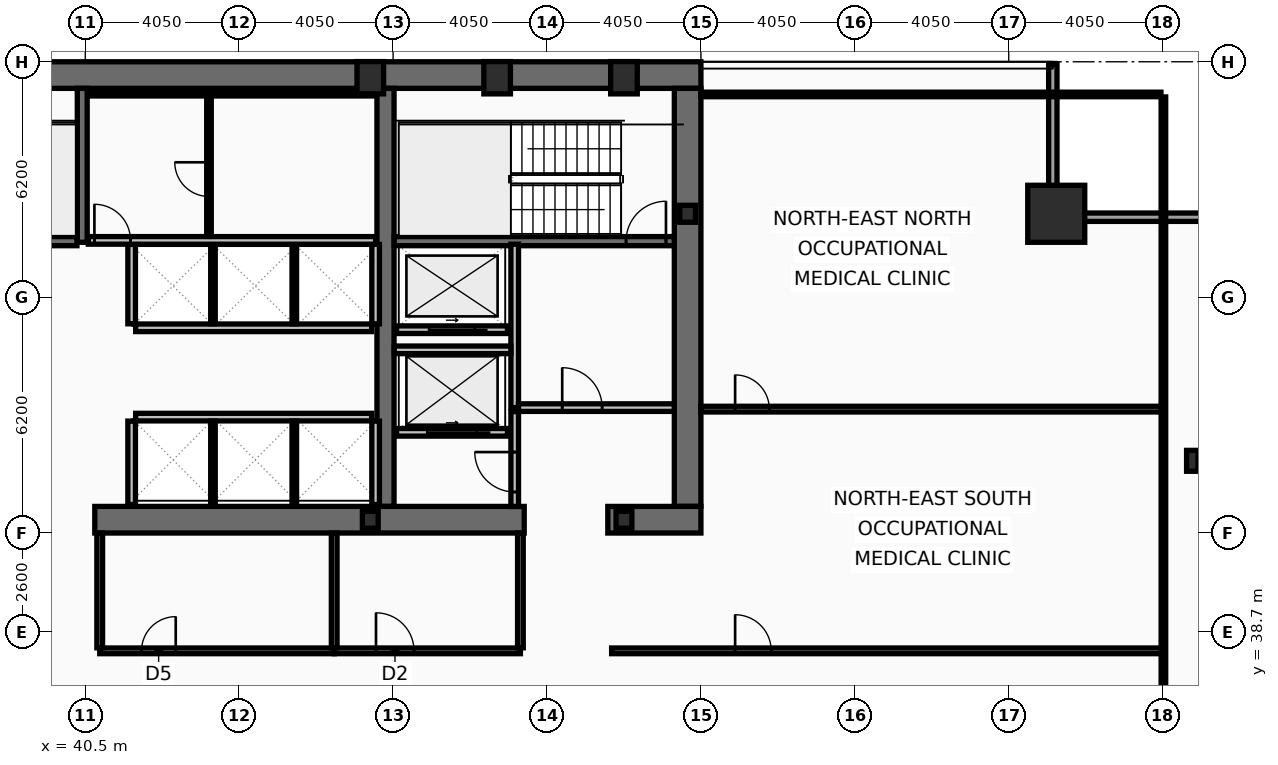
"""IFC4 building model, lengths in metres.
Left out: names, types, materials, properties, quantities, classifications, styles, units other than length and angle.
Written with IfcOpenShell. Run it as: python <this file> out.ifc"""

import sys

from ifc_helpers import new_model, si_unit, direction, frame, frame_2d, origin, origin_2d, place, context, subcontext, project, spatial, rectangle, hollow_rectangle, i_section, extrude, element, fill, save


model = new_model("IFC4")
c1 = context("Model", 3, precision=1e-05, world=origin(), true_north=direction((0.0, 1.0)))
c2 = subcontext(c1, "Body", "Model", "MODEL_VIEW")
j1 = project(units=[si_unit("LENGTHUNIT", "METRE"), si_unit("PLANEANGLEUNIT", "RADIAN")], contexts=[c1])
p1 = place(None, origin())
s1 = spatial("IfcSite", under=j1, at=p1, CompositionType="ELEMENT")
p2 = place(p1, origin())
s2 = spatial("IfcBuilding", under=s1, at=p2, CompositionType="ELEMENT")
p3 = place(p2, frame((0.0, 0.0, 132.6)))
s3 = spatial("IfcBuildingStorey", under=s2, at=p3, CompositionType="ELEMENT", Elevation=132.6)
p4 = place(p3, frame((16.2, 53.35, 0.0), z_axis=(0.0, 0.0, 1.0), x_axis=(1.0, 0.0, 0.0)))
e1 = element("IfcWall", 1, at=p4, inside=s3, PredefinedType="SHEAR", context=c2, shape_type="SweptSolid", body=[
    extrude(rectangle(XDim=40.5, YDim=0.7, at=frame_2d((20.25, 0.0))), origin(), (0.0, 0.0, 1.0), 3.44),
])
p5 = place(p3, frame((56.35, 53.0, 0.0), z_axis=(0.0, 0.0, 1.0), x_axis=(0.0, -1.0, 0.0)))
e2 = element("IfcWall", 2, at=p5, inside=s3, PredefinedType="SHEAR", context=c2, shape_type="SweptSolid", body=[
    extrude(rectangle(XDim=11.0, YDim=0.7, at=frame_2d((5.5, 0.0))), origin(), (0.0, 0.0, 1.0), 3.44),
])
p6 = place(p3, frame((48.4, 42.0, 0.0), z_axis=(0.0, 0.0, 1.0), x_axis=(0.0, 1.0, 0.0)))
e3 = element("IfcWall", 3, at=p6, inside=s3, PredefinedType="SHEAR", context=c2, shape_type="SweptSolid", body=[
    extrude(rectangle(XDim=11.0, YDim=0.45, at=frame_2d((5.5, 0.0))), origin(), (0.0, 0.0, 1.0), 3.44),
])
p7 = place(p3, frame((52.05, 41.65, 0.0), z_axis=(0.0, 0.0, 1.0), x_axis=(-1.0, 0.0, 0.0)))
e4 = element("IfcWall", 4, at=p7, inside=s3, PredefinedType="SHEAR", context=c2, shape_type="SweptSolid", body=[
    extrude(rectangle(XDim=11.3, YDim=0.7, at=frame_2d((5.65, 0.0))), origin(), (0.0, 0.0, 1.0), 3.44),
])
p8 = place(p3, frame((56.7, 41.65, 0.0), z_axis=(0.0, 0.0, 1.0), x_axis=(-1.0, 0.0, 0.0)))
e5 = element("IfcWall", 5, at=p8, inside=s3, PredefinedType="SHEAR", context=c2, shape_type="SweptSolid", body=[
    extrude(rectangle(XDim=2.45, YDim=0.7, at=frame_2d((1.225, 0.0))), origin(), (0.0, 0.0, 1.0), 3.44),
])
p9 = place(p3, frame((40.42, 48.95, 0.0), z_axis=(0.0, 0.0, 1.0), x_axis=(0.0, 1.0, 0.0)))
e6 = element("IfcWall", 6, at=p9, inside=s3, PredefinedType="SHEAR", context=c2, shape_type="SweptSolid", body=[
    extrude(rectangle(XDim=4.05, YDim=0.26, at=frame_2d((2.025, 0.0))), origin(), (0.0, 0.0, 1.0), 3.44),
])
p10 = place(p3, frame((48.63, 48.98, 0.0), z_axis=(0.0, 0.0, 1.0), x_axis=(1.0, 0.0, 0.0)))
e7 = element("IfcWall", 7, at=p10, inside=s3, PredefinedType="SHEAR", context=c2, shape_type="SweptSolid", body=[
    extrude(rectangle(XDim=7.37, YDim=0.24, at=frame_2d((3.685, 0.0))), origin(), (0.0, 0.0, 1.0), 3.44),
])
p11 = place(p10, frame((6.1, 0.0, 0.0)))
e8 = element("IfcOpeningElement", 8, at=p11, cuts=e7, PredefinedType="OPENING", context=c2, shape_type="SweptSolid", body=[
    extrude(rectangle(XDim=1.05, YDim=2.15, at=frame_2d((0.525, 1.075))), frame((0.0, 0.13, 0.0), z_axis=(0.0, -1.0, 0.0), x_axis=(1.0, 0.0, 0.0)), (0.0, 0.0, 1.0), 0.26),
])
p12 = place(p3, frame((32.72, 48.98, 0.0), z_axis=(0.0, 0.0, 1.0), x_axis=(1.0, 0.0, 0.0)))
e9 = element("IfcWall", 9, at=p12, inside=s3, PredefinedType="SHEAR", context=c2, shape_type="SweptSolid", body=[
    extrude(rectangle(XDim=7.56, YDim=0.24, at=frame_2d((3.78, 0.0))), origin(), (0.0, 0.0, 1.0), 3.44),
])
p13 = place(p12, frame((0.22, 0.0, 0.0)))
e10 = element("IfcOpeningElement", 10, at=p13, cuts=e9, PredefinedType="OPENING", context=c2, shape_type="SweptSolid", body=[
    extrude(rectangle(XDim=1.05, YDim=2.15, at=frame_2d((0.525, 1.075))), frame((0.0, 0.13, 0.0), z_axis=(0.0, -1.0, 0.0), x_axis=(1.0, 0.0, 0.0)), (0.0, 0.0, 1.0), 0.26),
])
p14 = place(p3, frame((66.05, 49.7, 0.0), z_axis=(0.0, 0.0, 1.0), x_axis=(1.0, 0.0, 0.0)))
e11 = element("IfcColumn", 11, at=p14, inside=s3, PredefinedType="COLUMN", context=c2, shape_type="SweptSolid", body=[
    extrude(hollow_rectangle(XDim=1.5, YDim=1.5, WallThickness=0.07, at=origin_2d()), origin(), (0.0, 0.0, 1.0), 3.6),
])
for number, where, z_axis, x_axis in (
    (12, (48.0, 53.28, 0.0), (0.0, 0.0, 1.0), (1.0, 0.0, 0.0)),
    (13, (51.337, 53.28, 0.0), (0.0, 0.0, 1.0), (1.0, 0.0, 0.0)),
    (14, (54.675, 53.28, 0.0), (0.0, 0.0, 1.0), (1.0, 0.0, 0.0)),
):
    element("IfcColumn", number, at=place(p3, frame(where, z_axis=z_axis, x_axis=x_axis)), inside=s3, PredefinedType="COLUMN", context=c2, shape_type="SweptSolid", body=[
        extrude(hollow_rectangle(XDim=0.7, YDim=0.85, WallThickness=0.05, at=origin_2d()), origin(), (0.0, 0.0, 1.0), 3.6),
    ])
p15 = place(p3, frame((69.63, 43.2, 0.0), z_axis=(0.0, 0.0, 1.0), x_axis=(1.0, 0.0, 0.0)))
e15 = element("IfcColumn", 15, at=p15, inside=s3, PredefinedType="COLUMN", context=c2, shape_type="SweptSolid", body=[
    extrude(i_section(OverallWidth=0.3, OverallDepth=0.55, WebThickness=0.015, FlangeThickness=0.029, at=origin_2d()), origin(), (0.0, 0.0, 1.0), 3.6),
])
for number, where, z_axis, x_axis in (
    (16, (56.35, 49.7, 0.0), (0.0, 0.0, 1.0), (1.0, 0.0, 0.0)),
    (17, (48.0, 41.65, 0.0), (0.0, 0.0, 1.0), (1.0, 0.0, 0.0)),
    (18, (54.675, 41.65, 0.0), (0.0, 0.0, 1.0), (1.0, 0.0, 0.0)),
):
    element("IfcColumn", number, at=place(p3, frame(where, z_axis=z_axis, x_axis=x_axis)), inside=s3, PredefinedType="COLUMN", context=c2, shape_type="SweptSolid", body=[
        extrude(i_section(OverallWidth=0.416, OverallDepth=0.446, WebThickness=0.039, FlangeThickness=0.063, at=origin_2d()), origin(), (0.0, 0.0, 1.0), 3.6),
    ])
p16 = place(p3, frame((65.96, 53.63, 0.0), z_axis=(0.0, 0.0, 1.0), x_axis=(0.0, -1.0, 0.0)))
e19 = element("IfcWall", 19, at=p16, inside=s3, PredefinedType="SOLIDWALL", context=c2, shape_type="SweptSolid", body=[
    extrude(rectangle(XDim=3.91, YDim=0.22, at=frame_2d((1.955, 0.0))), origin(), (0.0, 0.0, 1.0), 2.09),
])
p17 = place(p3, frame((65.85, 49.61, 0.0), z_axis=(0.0, 0.0, 1.0), x_axis=(1.0, 0.0, 0.0)))
e20 = element("IfcWall", 20, at=p17, inside=s3, PredefinedType="SOLIDWALL", context=c2, shape_type="SweptSolid", body=[
    extrude(rectangle(XDim=4.13, YDim=0.22, at=frame_2d((2.065, 0.0))), origin(), (0.0, 0.0, 1.0), 2.09),
])
p18 = place(p3, frame((51.61, 43.95, 0.0), z_axis=(0.0, 0.0, 1.0), x_axis=(-1.0, 0.0, 0.0)))
e21 = element("IfcWall", 21, at=p18, inside=s3, PredefinedType="PARTITIONING", context=c2, shape_type="SweptSolid", body=[
    extrude(rectangle(XDim=2.92, YDim=0.2, at=frame_2d((1.46, 0.0))), origin(), (0.0, 0.0, 1.0), 3.44),
])
p19 = place(p18, frame((0.81, 0.0, 0.0)))
e22 = element("IfcOpeningElement", 22, at=p19, cuts=e21, PredefinedType="OPENING", context=c2, shape_type="SweptSolid", body=[
    extrude(rectangle(XDim=1.3, YDim=2.18, at=frame_2d((0.65, 1.09))), frame((0.0, 0.11, 0.0), z_axis=(0.0, -1.0, 0.0), x_axis=(1.0, 0.0, 0.0)), (0.0, 0.0, 1.0), 0.22),
])
p20 = place(p3, frame((51.61, 46.65, 0.0), z_axis=(0.0, 0.0, 1.0), x_axis=(-1.0, 0.0, 0.0)))
e23 = element("IfcWall", 23, at=p20, inside=s3, PredefinedType="PARTITIONING", context=c2, shape_type="SweptSolid", body=[
    extrude(rectangle(XDim=2.92, YDim=0.2, at=frame_2d((1.46, 0.0))), origin(), (0.0, 0.0, 1.0), 3.44),
])
p21 = place(p20, frame((0.86, 0.0, 0.0)))
e24 = element("IfcOpeningElement", 24, at=p21, cuts=e23, PredefinedType="OPENING", context=c2, shape_type="SweptSolid", body=[
    extrude(rectangle(XDim=1.2, YDim=2.18, at=frame_2d((0.6, 1.09))), frame((0.0, 0.11, 0.0), z_axis=(0.0, -1.0, 0.0), x_axis=(1.0, 0.0, 0.0)), (0.0, 0.0, 1.0), 0.22),
])
p22 = place(p3, frame((51.8, 44.6, 0.0), z_axis=(0.0, 0.0, 1.0), x_axis=(0.0, 1.0, 0.0)))
e25 = element("IfcWall", 25, at=p22, inside=s3, PredefinedType="PARTITIONING", context=c2, shape_type="SweptSolid", body=[
    extrude(rectangle(XDim=4.3, YDim=0.2, at=frame_2d((2.15, 0.0))), origin(), (0.0, 0.0, 1.0), 3.44),
])
p23 = place(p3, frame((51.9, 44.6, 0.0), z_axis=(0.0, 0.0, 1.0), x_axis=(1.0, 0.0, 0.0)))
e26 = element("IfcWall", 26, at=p23, inside=s3, PredefinedType="PARTITIONING", context=c2, shape_type="SweptSolid", body=[
    extrude(rectangle(XDim=4.1, YDim=0.2, at=frame_2d((2.05, 0.0))), origin(), (0.0, 0.0, 1.0), 3.44),
])
p24 = place(p23, frame((1.15, 0.0, 0.0)))
e27 = element("IfcOpeningElement", 27, at=p24, cuts=e26, PredefinedType="OPENING", context=c2, shape_type="SweptSolid", body=[
    extrude(rectangle(XDim=1.05, YDim=2.15, at=frame_2d((0.525, 1.075))), frame((0.0, 0.11, 0.0), z_axis=(0.0, -1.0, 0.0), x_axis=(1.0, 0.0, 0.0)), (0.0, 0.0, 1.0), 0.22),
])
p25 = place(p3, frame((48.63, 46.12, 0.0), z_axis=(0.0, 0.0, 1.0), x_axis=(1.0, 0.0, 0.0)))
e28 = element("IfcWall", 28, at=p25, inside=s3, PredefinedType="PARTITIONING", context=c2, shape_type="SweptSolid", body=[
    extrude(rectangle(XDim=3.07, YDim=0.2, at=frame_2d((1.535, 0.0))), origin(), (0.0, 0.0, 1.0), 3.44),
])
p26 = place(p3, frame((51.8, 42.0, 0.0), z_axis=(0.0, 0.0, 1.0), x_axis=(0.0, 1.0, 0.0)))
e29 = element("IfcWall", 29, at=p26, inside=s3, PredefinedType="PARTITIONING", context=c2, shape_type="SweptSolid", body=[
    extrude(rectangle(XDim=2.495, YDim=0.2, at=frame_2d((1.248, 0.0))), origin(), (0.0, 0.0, 1.0), 3.44),
])
p27 = place(p26, frame((0.38, 0.0, 0.0)))
e30 = element("IfcOpeningElement", 30, at=p27, cuts=e29, PredefinedType="OPENING", context=c2, shape_type="SweptSolid", body=[
    extrude(rectangle(XDim=1.05, YDim=2.15, at=frame_2d((0.525, 1.075))), frame((0.0, 0.11, 0.0), z_axis=(0.0, -1.0, 0.0), x_axis=(1.0, 0.0, 0.0)), (0.0, 0.0, 1.0), 0.22),
])
p28 = place(p3, frame((41.825, 46.7, 0.0), z_axis=(0.0, 0.0, 1.0), x_axis=(1.0, 0.0, 0.0)))
e31 = element("IfcWall", 31, at=p28, inside=s3, PredefinedType="PARTITIONING", context=c2, shape_type="SweptSolid", body=[
    extrude(rectangle(XDim=6.21, YDim=0.2, at=frame_2d((3.105, 0.0))), origin(), (0.0, 0.0, 1.0), 3.44),
])
for number, where, z_axis, x_axis in (
    (32, (41.72, 46.805, 0.0), (0.0, 0.0, 1.0), (0.0, 1.0, 0.0)),
    (33, (48.14, 46.805, 0.0), (0.0, 0.0, 1.0), (0.0, 1.0, 0.0)),
):
    element("IfcWall", number, at=place(p3, frame(where, z_axis=z_axis, x_axis=x_axis)), inside=s3, PredefinedType="PARTITIONING", context=c2, shape_type="SweptSolid", body=[
        extrude(rectangle(XDim=2.09, YDim=0.2, at=frame_2d((1.045, 0.0))), origin(), (0.0, 0.0, 1.0), 3.44),
    ])
for number, where, z_axis, x_axis in (
    (34, (43.86, 46.805, 0.0), (0.0, 0.0, 1.0), (0.0, 1.0, 0.0)),
    (35, (46.0, 46.805, 0.0), (0.0, 0.0, 1.0), (0.0, 1.0, 0.0)),
):
    element("IfcWall", number, at=place(p3, frame(where, z_axis=z_axis, x_axis=x_axis)), inside=s3, PredefinedType="PARTITIONING", context=c2, shape_type="SweptSolid", body=[
        extrude(rectangle(XDim=2.09, YDim=0.12, at=frame_2d((1.045, 0.0))), origin(), (0.0, 0.0, 1.0), 3.44),
    ])
p29 = place(p3, frame((41.825, 44.35, 0.0), z_axis=(0.0, 0.0, 1.0), x_axis=(1.0, 0.0, 0.0)))
e36 = element("IfcWall", 36, at=p29, inside=s3, PredefinedType="PARTITIONING", context=c2, shape_type="SweptSolid", body=[
    extrude(rectangle(XDim=6.21, YDim=0.2, at=frame_2d((3.105, 0.0))), origin(), (0.0, 0.0, 1.0), 3.44),
])
for number, where, z_axis, x_axis in (
    (37, (41.72, 42.05, 0.0), (0.0, 0.0, 1.0), (0.0, 1.0, 0.0)),
    (38, (48.14, 42.05, 0.0), (0.0, 0.0, 1.0), (0.0, 1.0, 0.0)),
):
    element("IfcWall", number, at=place(p3, frame(where, z_axis=z_axis, x_axis=x_axis)), inside=s3, PredefinedType="PARTITIONING", context=c2, shape_type="SweptSolid", body=[
        extrude(rectangle(XDim=2.195, YDim=0.2, at=frame_2d((1.098, 0.0))), origin(), (0.0, 0.0, 1.0), 3.44),
    ])
for number, where, z_axis, x_axis in (
    (39, (43.86, 42.05, 0.0), (0.0, 0.0, 1.0), (0.0, 1.0, 0.0)),
    (40, (46.0, 42.05, 0.0), (0.0, 0.0, 1.0), (0.0, 1.0, 0.0)),
):
    element("IfcWall", number, at=place(p3, frame(where, z_axis=z_axis, x_axis=x_axis)), inside=s3, PredefinedType="PARTITIONING", context=c2, shape_type="SweptSolid", body=[
        extrude(rectangle(XDim=2.195, YDim=0.12, at=frame_2d((1.098, 0.0))), origin(), (0.0, 0.0, 1.0), 3.44),
    ])
p30 = place(p3, frame((40.58, 52.86, 0.0), z_axis=(0.0, 0.0, 1.0), x_axis=(1.0, 0.0, 0.0)))
e41 = element("IfcWall", 41, at=p30, inside=s3, PredefinedType="PARTITIONING", context=c2, shape_type="SweptSolid", body=[
    extrude(rectangle(XDim=7.56, YDim=0.12, at=frame_2d((3.78, 0.0))), origin(), (0.0, 0.0, 1.0), 3.44),
])
p31 = place(p3, frame((40.58, 49.0, 0.0), z_axis=(0.0, 0.0, 1.0), x_axis=(1.0, 0.0, 0.0)))
e42 = element("IfcWall", 42, at=p31, inside=s3, PredefinedType="PARTITIONING", context=c2, shape_type="SweptSolid", body=[
    extrude(rectangle(XDim=7.56, YDim=0.2, at=frame_2d((3.78, 0.0))), origin(), (0.0, 0.0, 1.0), 3.44),
])
p32 = place(p31, frame((0.16, 0.0, 0.0)))
e43 = element("IfcOpeningElement", 43, at=p32, cuts=e42, PredefinedType="OPENING", context=c2, shape_type="SweptSolid", body=[
    extrude(rectangle(XDim=0.95, YDim=2.1, at=frame_2d((0.475, 1.05))), frame((0.0, 0.11, 0.0), z_axis=(0.0, -1.0, 0.0), x_axis=(1.0, 0.0, 0.0)), (0.0, 0.0, 1.0), 0.22),
])
p33 = place(p3, frame((43.755, 49.105, 0.0), z_axis=(0.0, 0.0, 1.0), x_axis=(0.0, 1.0, 0.0)))
e44 = element("IfcWall", 44, at=p33, inside=s3, PredefinedType="PARTITIONING", context=c2, shape_type="SweptSolid", body=[
    extrude(rectangle(XDim=3.69, YDim=0.12, at=frame_2d((1.845, 0.0))), origin(), (0.0, 0.0, 1.0), 3.44),
])
p34 = place(p33, frame((1.05, 0.0, 0.0)))
e45 = element("IfcOpeningElement", 45, at=p34, cuts=e44, PredefinedType="OPENING", context=c2, shape_type="SweptSolid", body=[
    extrude(rectangle(XDim=0.9, YDim=2.05, at=frame_2d((0.45, 1.025))), frame((0.0, 0.07, 0.0), z_axis=(0.0, -1.0, 0.0), x_axis=(1.0, 0.0, 0.0)), (0.0, 0.0, 1.0), 0.14),
])
p35 = place(p3, frame((40.88, 38.2, 0.0), z_axis=(0.0, 0.0, 1.0), x_axis=(1.0, 0.0, 0.0)))
e46 = element("IfcWall", 46, at=p35, inside=s3, PredefinedType="PARTITIONING", context=c2, shape_type="SweptSolid", body=[
    extrude(rectangle(XDim=6.17, YDim=0.15, at=frame_2d((3.085, 0.0))), origin(), (0.0, 0.0, 1.0), 2.73),
])
p36 = place(p35, frame((1.1, 0.0, 0.0)))
e47 = element("IfcOpeningElement", 47, at=p36, cuts=e46, PredefinedType="OPENING", context=c2, shape_type="SweptSolid", body=[
    extrude(rectangle(XDim=0.9, YDim=2.05, at=frame_2d((0.45, 1.025))), frame((0.0, 0.085, 0.0), z_axis=(0.0, -1.0, 0.0), x_axis=(1.0, 0.0, 0.0)), (0.0, 0.0, 1.0), 0.17),
])
p37 = place(p3, frame((47.05, 38.2, 0.0), z_axis=(0.0, 0.0, 1.0), x_axis=(1.0, 0.0, 0.0)))
e48 = element("IfcWall", 48, at=p37, inside=s3, PredefinedType="PARTITIONING", context=c2, shape_type="SweptSolid", body=[
    extrude(rectangle(XDim=4.9, YDim=0.15, at=frame_2d((2.45, 0.0))), origin(), (0.0, 0.0, 1.0), 2.73),
])
p38 = place(p37, frame((1.1, 0.0, 0.0)))
e49 = element("IfcOpeningElement", 49, at=p38, cuts=e48, PredefinedType="OPENING", context=c2, shape_type="SweptSolid", body=[
    extrude(rectangle(XDim=1.0, YDim=2.05, at=frame_2d((0.5, 1.025))), frame((0.0, 0.085, 0.0), z_axis=(0.0, -1.0, 0.0), x_axis=(1.0, 0.0, 0.0)), (0.0, 0.0, 1.0), 0.17),
])
for number, where, z_axis, x_axis in (
    (50, (40.88, 38.28, 0.0), (0.0, 0.0, 1.0), (0.0, 1.0, 0.0)),
    (51, (47.05, 38.28, 0.0), (0.0, 0.0, 1.0), (0.0, 1.0, 0.0)),
    (52, (51.95, 38.28, 0.0), (0.0, 0.0, 1.0), (0.0, 1.0, 0.0)),
):
    element("IfcWall", number, at=place(p3, frame(where, z_axis=z_axis, x_axis=x_axis)), inside=s3, PredefinedType="PARTITIONING", context=c2, shape_type="SweptSolid", body=[
        extrude(rectangle(XDim=3.02, YDim=0.15, at=frame_2d((1.51, 0.0))), origin(), (0.0, 0.0, 1.0), 3.44),
    ])
p39 = place(p3, frame((54.35, 38.2, 0.0), z_axis=(0.0, 0.0, 1.0), x_axis=(1.0, 0.0, 0.0)))
e53 = element("IfcWall", 53, at=p39, inside=s3, PredefinedType="PARTITIONING", context=c2, shape_type="SweptSolid", body=[
    extrude(rectangle(XDim=14.52, YDim=0.15, at=frame_2d((7.26, 0.0))), origin(), (0.0, 0.0, 1.0), 2.73),
])
p40 = place(p39, frame((3.25, 0.0, 0.0)))
e54 = element("IfcOpeningElement", 54, at=p40, cuts=e53, PredefinedType="OPENING", context=c2, shape_type="SweptSolid", body=[
    extrude(rectangle(XDim=0.95, YDim=2.05, at=frame_2d((0.475, 1.025))), frame((0.0, 0.085, 0.0), z_axis=(0.0, -1.0, 0.0), x_axis=(1.0, 0.0, 0.0)), (0.0, 0.0, 1.0), 0.17),
])
p41 = place(p3, frame((56.7, 44.56, 0.0), z_axis=(0.0, 0.0, 1.0), x_axis=(1.0, 0.0, 0.0)))
e55 = element("IfcWall", 55, at=p41, inside=s3, PredefinedType="PARTITIONING", context=c2, shape_type="SweptSolid", body=[
    extrude(rectangle(XDim=12.105, YDim=0.15, at=frame_2d((6.052, 0.0))), origin(), (0.0, 0.0, 1.0), 2.83),
])
p42 = place(p41, frame((0.9, 0.0, 0.0)))
e56 = element("IfcOpeningElement", 56, at=p42, cuts=e55, PredefinedType="OPENING", context=c2, shape_type="SweptSolid", body=[
    extrude(rectangle(XDim=0.9, YDim=2.05, at=frame_2d((0.45, 1.025))), frame((0.0, 0.085, 0.0), z_axis=(0.0, -1.0, 0.0), x_axis=(1.0, 0.0, 0.0)), (0.0, 0.0, 1.0), 0.17),
])
p43 = place(p3, frame((68.87, 10.665, 0.0), z_axis=(0.0, 0.0, 1.0), x_axis=(0.0, 1.0, 0.0)))
e57 = element("IfcWall", 57, at=p43, inside=s3, PredefinedType="PARTITIONING", context=c2, shape_type="SweptSolid", body=[
    extrude(rectangle(XDim=42.11, YDim=0.12, at=frame_2d((21.055, 0.0))), origin(), (0.0, 0.0, 1.0), 1.83),
])
p44 = place(p3, frame((56.7, 52.84, 0.0), z_axis=(0.0, 0.0, 1.0), x_axis=(1.0, 0.0, 0.0)))
e58 = element("IfcWall", 58, at=p44, inside=s3, PredefinedType="PARTITIONING", context=c2, shape_type="SweptSolid", body=[
    extrude(rectangle(XDim=12.105, YDim=0.12, at=frame_2d((6.052, 0.0))), origin(), (0.0, 0.0, 1.0), 3.44),
])
p45 = place(p11, origin())
e59 = element("IfcDoor", 59, at=p45, inside=s3, OperationType="SINGLE_SWING_RIGHT", PredefinedType="DOOR", context=c2, shape_type="SweptSolid", body=[
    extrude(rectangle(XDim=1.05, YDim=2.15, at=frame_2d((0.525, 1.075))), frame((0.0, 0.025, 0.0), z_axis=(0.0, -1.0, 0.0), x_axis=(1.0, 0.0, 0.0)), (0.0, 0.0, 1.0), 0.05),
])
fill(e8, e59)
p46 = place(p19, origin())
e60 = element("IfcDoor", 60, at=p46, inside=s3, OperationType="SLIDING_TO_LEFT", PredefinedType="DOOR", context=c2, shape_type="SweptSolid", body=[
    extrude(rectangle(XDim=1.3, YDim=2.18, at=frame_2d((0.65, 1.09))), frame((0.0, 0.025, 0.0), z_axis=(0.0, -1.0, 0.0), x_axis=(1.0, 0.0, 0.0)), (0.0, 0.0, 1.0), 0.05),
])
fill(e22, e60)
p47 = place(p21, origin())
e61 = element("IfcDoor", 61, at=p47, inside=s3, OperationType="SLIDING_TO_LEFT", PredefinedType="DOOR", context=c2, shape_type="SweptSolid", body=[
    extrude(rectangle(XDim=1.2, YDim=2.18, at=frame_2d((0.6, 1.09))), frame((0.0, 0.025, 0.0), z_axis=(0.0, -1.0, 0.0), x_axis=(1.0, 0.0, 0.0)), (0.0, 0.0, 1.0), 0.05),
])
fill(e24, e61)
p48 = place(p24, origin())
e62 = element("IfcDoor", 62, at=p48, inside=s3, OperationType="SINGLE_SWING_LEFT", PredefinedType="DOOR", context=c2, shape_type="SweptSolid", body=[
    extrude(rectangle(XDim=1.05, YDim=2.15, at=frame_2d((0.525, 1.075))), frame((0.0, 0.025, 0.0), z_axis=(0.0, -1.0, 0.0), x_axis=(1.0, 0.0, 0.0)), (0.0, 0.0, 1.0), 0.05),
])
fill(e27, e62)
p49 = place(p27, origin())
e63 = element("IfcDoor", 63, at=p49, inside=s3, OperationType="SINGLE_SWING_RIGHT", PredefinedType="DOOR", context=c2, shape_type="SweptSolid", body=[
    extrude(rectangle(XDim=1.05, YDim=2.15, at=frame_2d((0.525, 1.075))), frame((0.0, 0.025, 0.0), z_axis=(0.0, -1.0, 0.0), x_axis=(1.0, 0.0, 0.0)), (0.0, 0.0, 1.0), 0.05),
])
fill(e30, e63)
p50 = place(p32, origin())
e64 = element("IfcDoor", 64, at=p50, inside=s3, OperationType="SINGLE_SWING_LEFT", PredefinedType="DOOR", context=c2, shape_type="SweptSolid", body=[
    extrude(rectangle(XDim=0.95, YDim=2.1, at=frame_2d((0.475, 1.05))), frame((0.0, 0.025, 0.0), z_axis=(0.0, -1.0, 0.0), x_axis=(1.0, 0.0, 0.0)), (0.0, 0.0, 1.0), 0.05),
])
fill(e43, e64)
p51 = place(p34, origin())
e65 = element("IfcDoor", 65, at=p51, inside=s3, OperationType="SINGLE_SWING_RIGHT", PredefinedType="DOOR", context=c2, shape_type="SweptSolid", body=[
    extrude(rectangle(XDim=0.9, YDim=2.05, at=frame_2d((0.45, 1.025))), frame((0.0, 0.025, 0.0), z_axis=(0.0, -1.0, 0.0), x_axis=(1.0, 0.0, 0.0)), (0.0, 0.0, 1.0), 0.05),
])
fill(e45, e65)
p52 = place(p36, origin())
e66 = element("IfcDoor", 66, at=p52, inside=s3, OperationType="SINGLE_SWING_RIGHT", PredefinedType="DOOR", context=c2, shape_type="SweptSolid", body=[
    extrude(rectangle(XDim=0.9, YDim=2.05, at=frame_2d((0.45, 1.025))), frame((0.0, 0.025, 0.0), z_axis=(0.0, -1.0, 0.0), x_axis=(1.0, 0.0, 0.0)), (0.0, 0.0, 1.0), 0.05),
])
fill(e47, e66)
p53 = place(p38, origin())
e67 = element("IfcDoor", 67, at=p53, inside=s3, OperationType="SINGLE_SWING_LEFT", PredefinedType="DOOR", context=c2, shape_type="SweptSolid", body=[
    extrude(rectangle(XDim=1.0, YDim=2.05, at=frame_2d((0.5, 1.025))), frame((0.0, 0.025, 0.0), z_axis=(0.0, -1.0, 0.0), x_axis=(1.0, 0.0, 0.0)), (0.0, 0.0, 1.0), 0.05),
])
fill(e49, e67)
p54 = place(p40, origin())
e68 = element("IfcDoor", 68, at=p54, inside=s3, OperationType="SINGLE_SWING_LEFT", PredefinedType="DOOR", context=c2, shape_type="SweptSolid", body=[
    extrude(rectangle(XDim=0.95, YDim=2.05, at=frame_2d((0.475, 1.025))), frame((0.0, 0.025, 0.0), z_axis=(0.0, -1.0, 0.0), x_axis=(1.0, 0.0, 0.0)), (0.0, 0.0, 1.0), 0.05),
])
fill(e54, e68)
p55 = place(p42, origin())
e69 = element("IfcDoor", 69, at=p55, inside=s3, OperationType="SINGLE_SWING_LEFT", PredefinedType="DOOR", context=c2, shape_type="SweptSolid", body=[
    extrude(rectangle(XDim=0.9, YDim=2.05, at=frame_2d((0.45, 1.025))), frame((0.0, 0.025, 0.0), z_axis=(0.0, -1.0, 0.0), x_axis=(1.0, 0.0, 0.0)), (0.0, 0.0, 1.0), 0.05),
])
fill(e56, e69)
save(model, sys.argv[1])
